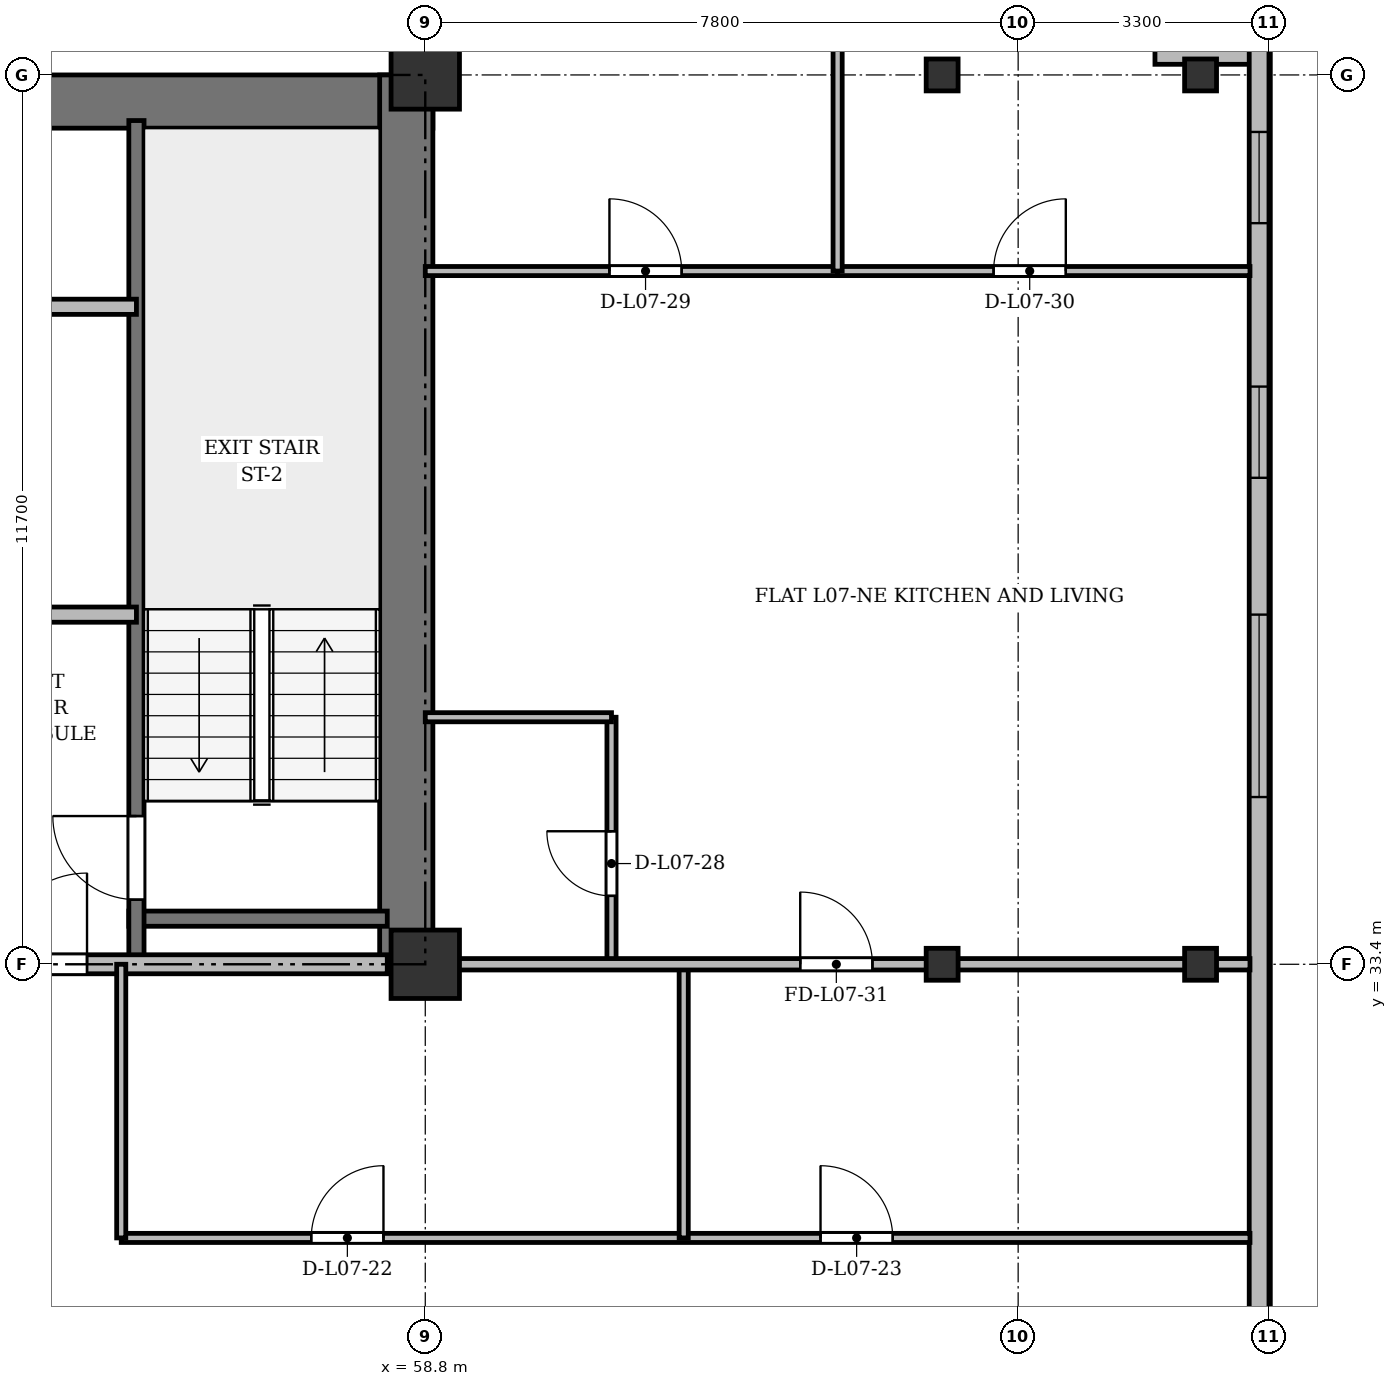
"""IFC4 building model, lengths in metres.
Left out: names, types, materials, properties, quantities, classifications, styles, units other than length and angle.
Written with IfcOpenShell. Run it as: python <this file> out.ifc"""

import sys

from ifc_helpers import new_model, si_unit, direction, frame, frame_2d, origin, origin_2d, place, context, subcontext, project, spatial, rectangle, i_section, extrude, source, transform, mapped, element, fill, save


model = new_model("IFC4")
c1 = context("Model", 3, precision=1e-05, world=origin(), true_north=direction((0.0, 1.0)))
c2 = subcontext(c1, "Body", "Model", "MODEL_VIEW")
j1 = project(units=[si_unit("LENGTHUNIT", "METRE"), si_unit("PLANEANGLEUNIT", "RADIAN")], contexts=[c1])
p1 = place(None, origin())
s1 = spatial("IfcSite", under=j1, at=p1, CompositionType="ELEMENT")
p2 = place(p1, origin())
s2 = spatial("IfcBuilding", under=s1, at=p2, CompositionType="ELEMENT")
p3 = place(p2, frame((0.0, 0.0, 30.7)))
s3 = spatial("IfcBuildingStorey", under=s2, at=p3, CompositionType="ELEMENT", Elevation=30.7)
m1 = source(origin(), c2, "Body", "SweptSolid", [
    extrude(rectangle(XDim=0.9, YDim=0.9, at=origin_2d()), origin(), (0.0, 0.0, 1.0), 3.6),
])
for number, where, z_axis, x_axis in (
    (1, (58.8, 33.4, 0.0), (0.0, 0.0, 1.0), (1.0, 0.0, 0.0)),
    (2, (58.8, 45.1, 0.0), (0.0, 0.0, 1.0), (1.0, 0.0, 0.0)),
):
    element("IfcColumn", number, at=place(p3, frame(where, z_axis=z_axis, x_axis=x_axis)), inside=s3, PredefinedType="COLUMN", context=c2, shape_type="MappedRepresentation", body=[
        mapped(m1, transform((0.0, 0.0, 0.0), x_axis=(1.0, 0.0, 0.0), y_axis=(0.0, 1.0, 0.0), z_axis=(0.0, 0.0, 1.0), scale=1.0)),
    ])
m2 = source(origin(), c2, "Body", "SweptSolid", [
    extrude(i_section(OverallWidth=0.42, OverallDepth=0.42, WebThickness=0.026, FlangeThickness=0.04, at=origin_2d()), origin(), (0.0, 0.0, 1.0), 3.6),
])
for number, where, z_axis, x_axis in (
    (3, (65.6, 33.4, 0.0), (0.0, 0.0, 1.0), (1.0, 0.0, 0.0)),
    (4, (65.6, 45.1, 0.0), (0.0, 0.0, 1.0), (1.0, 0.0, 0.0)),
    (5, (69.0, 33.4, 0.0), (0.0, 0.0, 1.0), (1.0, 0.0, 0.0)),
    (6, (69.0, 45.1, 0.0), (0.0, 0.0, 1.0), (1.0, 0.0, 0.0)),
):
    element("IfcColumn", number, at=place(p3, frame(where, z_axis=z_axis, x_axis=x_axis)), inside=s3, PredefinedType="COLUMN", context=c2, shape_type="MappedRepresentation", body=[
        mapped(m2, transform((0.0, 0.0, 0.0), x_axis=(1.0, 0.0, 0.0), y_axis=(0.0, 1.0, 0.0), z_axis=(0.0, 0.0, 1.0), scale=1.0)),
    ])
p4 = place(p3, frame((68.4, 45.37, 0.0), z_axis=(0.0, 0.0, 1.0), x_axis=(1.0, 0.0, 0.0)))
e7 = element("IfcWall", 7, at=p4, inside=s3, PredefinedType="SOLIDWALL", context=c2, shape_type="SweptSolid", body=[
    extrude(rectangle(XDim=1.5, YDim=0.26, at=frame_2d((0.75, 0.0))), origin(), (0.0, 0.0, 1.0), 2.69),
])
p5 = place(p3, frame((69.77, 45.5, 0.0), z_axis=(0.0, 0.0, 1.0), x_axis=(0.0, -1.0, 0.0)))
e8 = element("IfcWall", 8, at=p5, inside=s3, PredefinedType="SOLIDWALL", context=c2, shape_type="SweptSolid", body=[
    extrude(rectangle(XDim=39.6, YDim=0.26, at=frame_2d((19.8, 0.0))), origin(), (0.0, 0.0, 1.0), 3.34),
])
p6 = place(p5, frame((36.95, 0.0, 0.92)))
e9 = element("IfcOpeningElement", 9, at=p6, cuts=e8, PredefinedType="OPENING", context=c2, shape_type="SweptSolid", body=[
    extrude(rectangle(XDim=1.2, YDim=1.65, at=frame_2d((0.6, 0.825))), frame((0.0, 0.14, 0.0), z_axis=(0.0, -1.0, 0.0), x_axis=(1.0, 0.0, 0.0)), (0.0, 0.0, 1.0), 0.28),
])
p7 = place(p5, frame((32.9, 0.0, 0.92)))
e10 = element("IfcOpeningElement", 10, at=p7, cuts=e8, PredefinedType="OPENING", context=c2, shape_type="SweptSolid", body=[
    extrude(rectangle(XDim=2.4, YDim=2.1, at=frame_2d((1.2, 1.05))), frame((0.0, 0.14, 0.0), z_axis=(0.0, -1.0, 0.0), x_axis=(1.0, 0.0, 0.0)), (0.0, 0.0, 1.0), 0.28),
])
p8 = place(p5, frame((28.7, 0.0, 0.92)))
e11 = element("IfcOpeningElement", 11, at=p8, cuts=e8, PredefinedType="OPENING", context=c2, shape_type="SweptSolid", body=[
    extrude(rectangle(XDim=2.4, YDim=2.1, at=frame_2d((1.2, 1.05))), frame((0.0, 0.14, 0.0), z_axis=(0.0, -1.0, 0.0), x_axis=(1.0, 0.0, 0.0)), (0.0, 0.0, 1.0), 0.28),
])
p9 = place(p5, frame((7.5, 0.0, 0.92)))
e12 = element("IfcOpeningElement", 12, at=p9, cuts=e8, PredefinedType="OPENING", context=c2, shape_type="SweptSolid", body=[
    extrude(rectangle(XDim=2.4, YDim=2.1, at=frame_2d((1.2, 1.05))), frame((0.0, 0.14, 0.0), z_axis=(0.0, -1.0, 0.0), x_axis=(1.0, 0.0, 0.0)), (0.0, 0.0, 1.0), 0.28),
])
p10 = place(p5, frame((4.5, 0.0, 0.92)))
e13 = element("IfcOpeningElement", 13, at=p10, cuts=e8, PredefinedType="OPENING", context=c2, shape_type="SweptSolid", body=[
    extrude(rectangle(XDim=1.2, YDim=1.65, at=frame_2d((0.6, 0.825))), frame((0.0, 0.14, 0.0), z_axis=(0.0, -1.0, 0.0), x_axis=(1.0, 0.0, 0.0)), (0.0, 0.0, 1.0), 0.28),
])
p11 = place(p5, frame((1.15, 0.0, 0.92)))
e14 = element("IfcOpeningElement", 14, at=p11, cuts=e8, PredefinedType="OPENING", context=c2, shape_type="SweptSolid", body=[
    extrude(rectangle(XDim=1.2, YDim=1.65, at=frame_2d((0.6, 0.825))), frame((0.0, 0.14, 0.0), z_axis=(0.0, -1.0, 0.0), x_axis=(1.0, 0.0, 0.0)), (0.0, 0.0, 1.0), 0.28),
])
p12 = place(p3, frame((15.5, 44.75, 0.0), z_axis=(0.0, 0.0, 1.0), x_axis=(1.0, 0.0, 0.0)))
e15 = element("IfcWall", 15, at=p12, inside=s3, PredefinedType="SHEAR", context=c2, shape_type="SweptSolid", body=[
    extrude(rectangle(XDim=43.4, YDim=0.7, at=frame_2d((21.7, 0.0))), origin(), (0.0, 0.0, 1.0), 3.34),
])
p13 = place(p3, frame((58.55, 33.4, 0.0), z_axis=(0.0, 0.0, 1.0), x_axis=(0.0, 1.0, 0.0)))
e16 = element("IfcWall", 16, at=p13, inside=s3, PredefinedType="SHEAR", context=c2, shape_type="SweptSolid", body=[
    extrude(rectangle(XDim=11.7, YDim=0.7, at=frame_2d((5.85, 0.0))), origin(), (0.0, 0.0, 1.0), 3.34),
])
p14 = place(p3, frame((54.9, 34.0, 0.0), z_axis=(0.0, 0.0, 1.0), x_axis=(1.0, 0.0, 0.0)))
e17 = element("IfcWall", 17, at=p14, inside=s3, PredefinedType="SHEAR", context=c2, shape_type="SweptSolid", body=[
    extrude(rectangle(XDim=3.4, YDim=0.2, at=frame_2d((1.7, 0.0))), origin(), (0.0, 0.0, 1.0), 3.34),
])
p15 = place(p3, frame((55.0, 33.4, 0.0), z_axis=(0.0, 0.0, 1.0), x_axis=(0.0, 1.0, 0.0)))
e18 = element("IfcWall", 18, at=p15, inside=s3, PredefinedType="SHEAR", context=c2, shape_type="SweptSolid", body=[
    extrude(rectangle(XDim=11.1, YDim=0.2, at=frame_2d((5.55, 0.0))), origin(), (0.0, 0.0, 1.0), 3.34),
])
p16 = place(p15, frame((0.85, 0.0, 0.0)))
e19 = element("IfcOpeningElement", 19, at=p16, cuts=e18, PredefinedType="OPENING", context=c2, shape_type="SweptSolid", body=[
    extrude(rectangle(XDim=1.1, YDim=2.15, at=frame_2d((0.55, 1.075))), frame((0.0, 0.11, 0.0), z_axis=(0.0, -1.0, 0.0), x_axis=(1.0, 0.0, 0.0)), (0.0, 0.0, 1.0), 0.22),
])
p17 = place(p3, frame((47.15, 42.05, 0.0), z_axis=(0.0, 0.0, 1.0), x_axis=(1.0, 0.0, 0.0)))
e20 = element("IfcWall", 20, at=p17, inside=s3, PredefinedType="SOLIDWALL", context=c2, shape_type="SweptSolid", body=[
    extrude(rectangle(XDim=7.85, YDim=0.2, at=frame_2d((3.925, 0.0))), origin(), (0.0, 0.0, 1.0), 2.752),
])
p18 = place(p17, frame((0.75, 0.0, 0.0)))
e21 = element("IfcOpeningElement", 21, at=p18, cuts=e20, PredefinedType="OPENING", context=c2, shape_type="SweptSolid", body=[
    extrude(rectangle(XDim=0.9, YDim=2.1, at=frame_2d((0.45, 1.05))), frame((0.0, 0.11, 0.0), z_axis=(0.0, -1.0, 0.0), x_axis=(1.0, 0.0, 0.0)), (0.0, 0.0, 1.0), 0.22),
])
p19 = place(p17, frame((3.85, 0.0, 0.0)))
e22 = element("IfcOpeningElement", 22, at=p19, cuts=e20, PredefinedType="OPENING", context=c2, shape_type="SweptSolid", body=[
    extrude(rectangle(XDim=0.9, YDim=2.1, at=frame_2d((0.45, 1.05))), frame((0.0, 0.11, 0.0), z_axis=(0.0, -1.0, 0.0), x_axis=(1.0, 0.0, 0.0)), (0.0, 0.0, 1.0), 0.22),
])
p20 = place(p3, frame((52.45, 38.0, 0.0), z_axis=(0.0, 0.0, 1.0), x_axis=(1.0, 0.0, 0.0)))
e23 = element("IfcWall", 23, at=p20, inside=s3, PredefinedType="PARTITIONING", context=c2, shape_type="SweptSolid", body=[
    extrude(rectangle(XDim=2.55, YDim=0.2, at=frame_2d((1.275, 0.0))), origin(), (0.0, 0.0, 1.0), 3.34),
])
p21 = place(p3, frame((47.15, 33.4, 0.0), z_axis=(0.0, 0.0, 1.0), x_axis=(1.0, 0.0, 0.0)))
e24 = element("IfcWall", 24, at=p21, inside=s3, PredefinedType="PARTITIONING", context=c2, shape_type="SweptSolid", body=[
    extrude(rectangle(XDim=11.15, YDim=0.25, at=frame_2d((5.575, 0.0))), origin(), (0.0, 0.0, 1.0), 2.69),
])
p22 = place(p21, frame((0.7, 0.0, 0.0)))
e25 = element("IfcOpeningElement", 25, at=p22, cuts=e24, PredefinedType="OPENING", context=c2, shape_type="SweptSolid", body=[
    extrude(rectangle(XDim=0.95, YDim=2.15, at=frame_2d((0.475, 1.075))), frame((0.0, 0.135, 0.0), z_axis=(0.0, -1.0, 0.0), x_axis=(1.0, 0.0, 0.0)), (0.0, 0.0, 1.0), 0.27),
])
p23 = place(p21, frame((6.0, 0.0, 0.0)))
e26 = element("IfcOpeningElement", 26, at=p23, cuts=e24, PredefinedType="OPENING", context=c2, shape_type="SweptSolid", body=[
    extrude(rectangle(XDim=1.2, YDim=2.15, at=frame_2d((0.6, 1.075))), frame((0.0, 0.135, 0.0), z_axis=(0.0, -1.0, 0.0), x_axis=(1.0, 0.0, 0.0)), (0.0, 0.0, 1.0), 0.27),
])
p24 = place(p3, frame((54.8, 29.8, 0.0), z_axis=(0.0, 0.0, 1.0), x_axis=(1.0, 0.0, 0.0)))
e27 = element("IfcWall", 27, at=p24, inside=s3, PredefinedType="PARTITIONING", context=c2, shape_type="SweptSolid", body=[
    extrude(rectangle(XDim=14.85, YDim=0.12, at=frame_2d((7.425, 0.0))), origin(), (0.0, 0.0, 1.0), 2.752),
])
p25 = place(p24, frame((2.5, 0.0, 0.0)))
e28 = element("IfcOpeningElement", 28, at=p25, cuts=e27, PredefinedType="OPENING", context=c2, shape_type="SweptSolid", body=[
    extrude(rectangle(XDim=0.95, YDim=2.15, at=frame_2d((0.475, 1.075))), frame((0.0, 0.07, 0.0), z_axis=(0.0, -1.0, 0.0), x_axis=(1.0, 0.0, 0.0)), (0.0, 0.0, 1.0), 0.14),
])
p26 = place(p24, frame((9.2, 0.0, 0.0)))
e29 = element("IfcOpeningElement", 29, at=p26, cuts=e27, PredefinedType="OPENING", context=c2, shape_type="SweptSolid", body=[
    extrude(rectangle(XDim=0.95, YDim=2.15, at=frame_2d((0.475, 1.075))), frame((0.0, 0.07, 0.0), z_axis=(0.0, -1.0, 0.0), x_axis=(1.0, 0.0, 0.0)), (0.0, 0.0, 1.0), 0.14),
])
for number, where, z_axis, x_axis in (
    (30, (62.2, 29.8, 0.0), (0.0, 0.0, 1.0), (0.0, 1.0, 0.0)),
    (31, (54.8, 29.8, 0.0), (0.0, 0.0, 1.0), (0.0, 1.0, 0.0)),
):
    element("IfcWall", number, at=place(p3, frame(where, z_axis=z_axis, x_axis=x_axis)), inside=s3, PredefinedType="PARTITIONING", context=c2, shape_type="SweptSolid", body=[
        extrude(rectangle(XDim=3.6, YDim=0.12, at=frame_2d((1.8, 0.0))), origin(), (0.0, 0.0, 1.0), 2.69),
    ])
p27 = place(p3, frame((61.25, 33.4, 0.0), z_axis=(0.0, 0.0, 1.0), x_axis=(0.0, 1.0, 0.0)))
e32 = element("IfcWall", 32, at=p27, inside=s3, PredefinedType="PARTITIONING", context=c2, shape_type="SweptSolid", body=[
    extrude(rectangle(XDim=3.25, YDim=0.12, at=frame_2d((1.625, 0.0))), origin(), (0.0, 0.0, 1.0), 2.69),
])
p28 = place(p27, frame((0.9, 0.0, 0.0)))
e33 = element("IfcOpeningElement", 33, at=p28, cuts=e32, PredefinedType="OPENING", context=c2, shape_type="SweptSolid", body=[
    extrude(rectangle(XDim=0.85, YDim=2.1, at=frame_2d((0.425, 1.05))), frame((0.0, 0.07, 0.0), z_axis=(0.0, -1.0, 0.0), x_axis=(1.0, 0.0, 0.0)), (0.0, 0.0, 1.0), 0.14),
])
p29 = place(p3, frame((58.8, 36.65, 0.0), z_axis=(0.0, 0.0, 1.0), x_axis=(1.0, 0.0, 0.0)))
e34 = element("IfcWall", 34, at=p29, inside=s3, PredefinedType="PARTITIONING", context=c2, shape_type="SweptSolid", body=[
    extrude(rectangle(XDim=2.45, YDim=0.12, at=frame_2d((1.225, 0.0))), origin(), (0.0, 0.0, 1.0), 2.752),
])
p30 = place(p3, frame((58.8, 42.52, 0.0), z_axis=(0.0, 0.0, 1.0), x_axis=(1.0, 0.0, 0.0)))
e35 = element("IfcWall", 35, at=p30, inside=s3, PredefinedType="PARTITIONING", context=c2, shape_type="SweptSolid", body=[
    extrude(rectangle(XDim=5.425, YDim=0.12, at=frame_2d((2.712, 0.0))), origin(), (0.0, 0.0, 1.0), 2.752),
])
p31 = place(p30, frame((2.423, 0.0, 0.0)))
e36 = element("IfcOpeningElement", 36, at=p31, cuts=e35, PredefinedType="OPENING", context=c2, shape_type="SweptSolid", body=[
    extrude(rectangle(XDim=0.95, YDim=2.15, at=frame_2d((0.475, 1.075))), frame((0.0, 0.07, 0.0), z_axis=(0.0, -1.0, 0.0), x_axis=(1.0, 0.0, 0.0)), (0.0, 0.0, 1.0), 0.14),
])
p32 = place(p3, frame((64.225, 42.52, 0.0), z_axis=(0.0, 0.0, 1.0), x_axis=(1.0, 0.0, 0.0)))
e37 = element("IfcWall", 37, at=p32, inside=s3, PredefinedType="PARTITIONING", context=c2, shape_type="SweptSolid", body=[
    extrude(rectangle(XDim=5.425, YDim=0.12, at=frame_2d((2.712, 0.0))), origin(), (0.0, 0.0, 1.0), 2.752),
])
p33 = place(p32, frame((2.052, 0.0, 0.0)))
e38 = element("IfcOpeningElement", 38, at=p33, cuts=e37, PredefinedType="OPENING", context=c2, shape_type="SweptSolid", body=[
    extrude(rectangle(XDim=0.95, YDim=2.15, at=frame_2d((0.475, 1.075))), frame((0.0, 0.07, 0.0), z_axis=(0.0, -1.0, 0.0), x_axis=(1.0, 0.0, 0.0)), (0.0, 0.0, 1.0), 0.14),
])
p34 = place(p3, frame((64.225, 42.52, 0.0), z_axis=(0.0, 0.0, 1.0), x_axis=(0.0, 1.0, 0.0)))
e39 = element("IfcWall", 39, at=p34, inside=s3, PredefinedType="PARTITIONING", context=c2, shape_type="SweptSolid", body=[
    extrude(rectangle(XDim=5.72, YDim=0.12, at=frame_2d((2.86, 0.0))), origin(), (0.0, 0.0, 1.0), 2.69),
])
p35 = place(p3, frame((58.8, 33.4, 0.0), z_axis=(0.0, 0.0, 1.0), x_axis=(1.0, 0.0, 0.0)))
e40 = element("IfcWall", 40, at=p35, inside=s3, PredefinedType="PARTITIONING", context=c2, shape_type="SweptSolid", body=[
    extrude(rectangle(XDim=10.85, YDim=0.15, at=frame_2d((5.425, 0.0))), origin(), (0.0, 0.0, 1.0), 2.69),
])
p36 = place(p35, frame((4.933, 0.0, 0.0)))
e41 = element("IfcOpeningElement", 41, at=p36, cuts=e40, PredefinedType="OPENING", context=c2, shape_type="SweptSolid", body=[
    extrude(rectangle(XDim=0.95, YDim=2.15, at=frame_2d((0.475, 1.075))), frame((0.0, 0.085, 0.0), z_axis=(0.0, -1.0, 0.0), x_axis=(1.0, 0.0, 0.0)), (0.0, 0.0, 1.0), 0.17),
])
p37 = place(p3, frame((58.8, 44.75, 0.0), z_axis=(0.0, 0.0, 1.0), x_axis=(0.0, 1.0, 0.0)))
e42 = element("IfcWall", 42, at=p37, inside=s3, PredefinedType="PARTITIONING", context=c2, shape_type="SweptSolid", body=[
    extrude(rectangle(XDim=3.61, YDim=0.15, at=frame_2d((1.805, 0.0))), origin(), (0.0, 0.0, 1.0), 2.752),
])
p38 = place(p37, frame((1.1, 0.0, 0.0)))
e43 = element("IfcOpeningElement", 43, at=p38, cuts=e42, PredefinedType="OPENING", context=c2, shape_type="SweptSolid", body=[
    extrude(rectangle(XDim=0.95, YDim=2.15, at=frame_2d((0.475, 1.075))), frame((0.0, 0.085, 0.0), z_axis=(0.0, -1.0, 0.0), x_axis=(1.0, 0.0, 0.0)), (0.0, 0.0, 1.0), 0.17),
])
m3 = source(origin(), c2, "Body", "SweptSolid", [
    extrude(rectangle(XDim=2.4, YDim=2.1, at=frame_2d((1.2, 1.05))), frame((0.0, 0.03, 0.0), z_axis=(0.0, -1.0, 0.0), x_axis=(1.0, 0.0, 0.0)), (0.0, 0.0, 1.0), 0.06),
])
p39 = place(p9, origin())
e44 = element("IfcWindow", 44, at=p39, inside=s3, PartitioningType="SINGLE_PANEL", PredefinedType="WINDOW", context=c2, shape_type="MappedRepresentation", body=[
    mapped(m3, transform((0.0, 0.0, 0.0), x_axis=(1.0, 0.0, 0.0), y_axis=(0.0, 1.0, 0.0), z_axis=(0.0, 0.0, 1.0), scale=1.0)),
])
fill(e12, e44)
m4 = source(origin(), c2, "Body", "SweptSolid", [
    extrude(rectangle(XDim=1.2, YDim=1.65, at=frame_2d((0.6, 0.825))), frame((0.0, 0.03, 0.0), z_axis=(0.0, -1.0, 0.0), x_axis=(1.0, 0.0, 0.0)), (0.0, 0.0, 1.0), 0.06),
])
p40 = place(p10, origin())
e45 = element("IfcWindow", 45, at=p40, inside=s3, PartitioningType="SINGLE_PANEL", PredefinedType="WINDOW", context=c2, shape_type="MappedRepresentation", body=[
    mapped(m4, transform((0.0, 0.0, 0.0), x_axis=(1.0, 0.0, 0.0), y_axis=(0.0, 1.0, 0.0), z_axis=(0.0, 0.0, 1.0), scale=1.0)),
])
fill(e13, e45)
p41 = place(p11, origin())
e46 = element("IfcWindow", 46, at=p41, inside=s3, PartitioningType="SINGLE_PANEL", PredefinedType="WINDOW", context=c2, shape_type="MappedRepresentation", body=[
    mapped(m4, transform((0.0, 0.0, 0.0), x_axis=(1.0, 0.0, 0.0), y_axis=(0.0, 1.0, 0.0), z_axis=(0.0, 0.0, 1.0), scale=1.0)),
])
fill(e14, e46)
m5 = source(origin(), c2, "Body", "SweptSolid", [
    extrude(rectangle(XDim=1.1, YDim=2.15, at=frame_2d((0.55, 1.075))), frame((0.0, 0.025, 0.0), z_axis=(0.0, -1.0, 0.0), x_axis=(1.0, 0.0, 0.0)), (0.0, 0.0, 1.0), 0.05),
])
p42 = place(p16, origin())
e47 = element("IfcDoor", 47, at=p42, inside=s3, OperationType="SINGLE_SWING_RIGHT", PredefinedType="DOOR", context=c2, shape_type="MappedRepresentation", body=[
    mapped(m5, transform((0.0, 0.0, 0.0), x_axis=(1.0, 0.0, 0.0), y_axis=(0.0, 1.0, 0.0), z_axis=(0.0, 0.0, 1.0), scale=1.0)),
])
fill(e19, e47)
m6 = source(origin(), c2, "Body", "SweptSolid", [
    extrude(rectangle(XDim=1.2, YDim=2.15, at=frame_2d((0.6, 1.075))), frame((0.0, 0.025, 0.0), z_axis=(0.0, -1.0, 0.0), x_axis=(1.0, 0.0, 0.0)), (0.0, 0.0, 1.0), 0.05),
])
p43 = place(p23, origin())
e48 = element("IfcDoor", 48, at=p43, inside=s3, OperationType="SINGLE_SWING_RIGHT", PredefinedType="DOOR", context=c2, shape_type="MappedRepresentation", body=[
    mapped(m6, transform((0.0, 0.0, 0.0), x_axis=(1.0, 0.0, 0.0), y_axis=(0.0, 1.0, 0.0), z_axis=(0.0, 0.0, 1.0), scale=1.0)),
])
fill(e26, e48)
m7 = source(origin(), c2, "Body", "SweptSolid", [
    extrude(rectangle(XDim=0.95, YDim=2.15, at=frame_2d((0.475, 1.075))), frame((0.0, 0.025, 0.0), z_axis=(0.0, -1.0, 0.0), x_axis=(1.0, 0.0, 0.0)), (0.0, 0.0, 1.0), 0.05),
])
p44 = place(p25, origin())
e49 = element("IfcDoor", 49, at=p44, inside=s3, OperationType="SINGLE_SWING_RIGHT", PredefinedType="DOOR", context=c2, shape_type="MappedRepresentation", body=[
    mapped(m7, transform((0.0, 0.0, 0.0), x_axis=(1.0, 0.0, 0.0), y_axis=(0.0, 1.0, 0.0), z_axis=(0.0, 0.0, 1.0), scale=1.0)),
])
fill(e28, e49)
p45 = place(p26, origin())
e50 = element("IfcDoor", 50, at=p45, inside=s3, OperationType="SINGLE_SWING_LEFT", PredefinedType="DOOR", context=c2, shape_type="MappedRepresentation", body=[
    mapped(m7, transform((0.0, 0.0, 0.0), x_axis=(1.0, 0.0, 0.0), y_axis=(0.0, 1.0, 0.0), z_axis=(0.0, 0.0, 1.0), scale=1.0)),
])
fill(e29, e50)
m8 = source(origin(), c2, "Body", "SweptSolid", [
    extrude(rectangle(XDim=0.85, YDim=2.1, at=frame_2d((0.425, 1.05))), frame((0.0, 0.025, 0.0), z_axis=(0.0, -1.0, 0.0), x_axis=(1.0, 0.0, 0.0)), (0.0, 0.0, 1.0), 0.05),
])
p46 = place(p28, origin())
e51 = element("IfcDoor", 51, at=p46, inside=s3, OperationType="SINGLE_SWING_RIGHT", PredefinedType="DOOR", context=c2, shape_type="MappedRepresentation", body=[
    mapped(m8, transform((0.0, 0.0, 0.0), x_axis=(1.0, 0.0, 0.0), y_axis=(0.0, 1.0, 0.0), z_axis=(0.0, 0.0, 1.0), scale=1.0)),
])
fill(e33, e51)
p47 = place(p31, origin())
e52 = element("IfcDoor", 52, at=p47, inside=s3, OperationType="SINGLE_SWING_LEFT", PredefinedType="DOOR", context=c2, shape_type="MappedRepresentation", body=[
    mapped(m7, transform((0.0, 0.0, 0.0), x_axis=(1.0, 0.0, 0.0), y_axis=(0.0, 1.0, 0.0), z_axis=(0.0, 0.0, 1.0), scale=1.0)),
])
fill(e36, e52)
p48 = place(p33, origin())
e53 = element("IfcDoor", 53, at=p48, inside=s3, OperationType="SINGLE_SWING_RIGHT", PredefinedType="DOOR", context=c2, shape_type="MappedRepresentation", body=[
    mapped(m7, transform((0.0, 0.0, 0.0), x_axis=(1.0, 0.0, 0.0), y_axis=(0.0, 1.0, 0.0), z_axis=(0.0, 0.0, 1.0), scale=1.0)),
])
fill(e38, e53)
p49 = place(p36, origin())
e54 = element("IfcDoor", 54, at=p49, inside=s3, OperationType="SINGLE_SWING_LEFT", PredefinedType="DOOR", context=c2, shape_type="MappedRepresentation", body=[
    mapped(m7, transform((0.0, 0.0, 0.0), x_axis=(1.0, 0.0, 0.0), y_axis=(0.0, 1.0, 0.0), z_axis=(0.0, 0.0, 1.0), scale=1.0)),
])
fill(e41, e54)
save(model, sys.argv[1])
